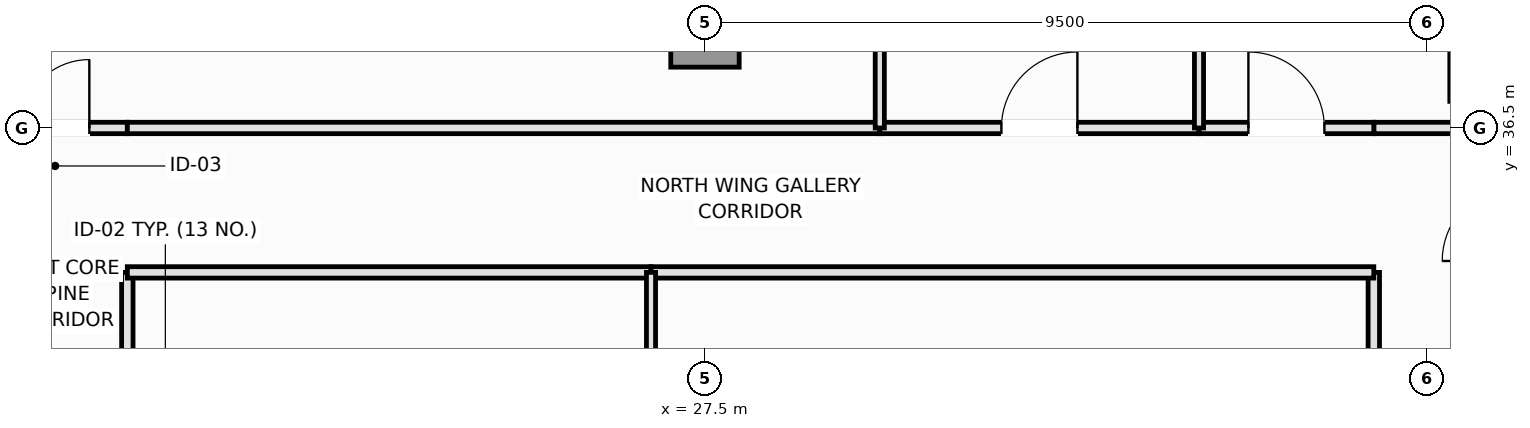
"""IFC4 building model, lengths in metres.
Left out: names, types, materials, properties, quantities, classifications, styles, units other than length and angle.
Written with IfcOpenShell. Run it as: python <this file> out.ifc"""

import sys

from ifc_helpers import new_model, si_unit, direction, frame, frame_2d, origin, origin_2d, place, context, subcontext, project, spatial, rectangle, extrude, element, fill, save


model = new_model("IFC4")
c1 = context("Model", 3, precision=1e-05, world=origin(), true_north=direction((0.0, 1.0)))
c2 = subcontext(c1, "Body", "Model", "MODEL_VIEW")
j1 = project(units=[si_unit("LENGTHUNIT", "METRE"), si_unit("PLANEANGLEUNIT", "RADIAN")], contexts=[c1])
p1 = place(None, origin())
s1 = spatial("IfcSite", under=j1, at=p1, CompositionType="ELEMENT")
p2 = place(p1, origin())
s2 = spatial("IfcBuilding", under=s1, at=p2, CompositionType="ELEMENT")
p3 = place(p2, frame((0.0, 0.0, 284.75)))
s3 = spatial("IfcBuildingStorey", under=s2, at=p3, CompositionType="ELEMENT", Elevation=284.75)
p4 = place(p3, frame((27.5, 37.75, 0.0), z_axis=(0.0, 0.0, 1.0), x_axis=(1.0, 0.0, 0.0)))
e1 = element("IfcColumn", 1, at=p4, inside=s3, PredefinedType="COLUMN", context=c2, shape_type="SweptSolid", body=[
    extrude(rectangle(XDim=0.9, YDim=0.9, at=origin_2d()), origin(), (0.0, 0.0, 1.0), 3.55),
])
p5 = place(p3, frame((19.9, 29.7, 0.0), z_axis=(0.0, 0.0, 1.0), x_axis=(0.0, 1.0, 0.0)))
e2 = element("IfcWall", 2, at=p5, inside=s3, PredefinedType="PARTITIONING", context=c2, shape_type="SweptSolid", body=[
    extrude(rectangle(XDim=4.9, YDim=0.15, at=frame_2d((2.45, 0.0))), origin(), (0.0, 0.0, 1.0), 3.39),
])
p6 = place(p5, frame((1.95, 0.0, 0.0)))
e3 = element("IfcOpeningElement", 3, at=p6, cuts=e2, PredefinedType="OPENING", context=c2, shape_type="SweptSolid", body=[
    extrude(rectangle(XDim=1.0, YDim=2.15, at=frame_2d((0.5, 1.075))), frame((0.0, 0.085, 0.0), z_axis=(0.0, -1.0, 0.0), x_axis=(1.0, 0.0, 0.0)), (0.0, 0.0, 1.0), 0.17),
])
p7 = place(p3, frame((18.0, 36.5, 0.0), z_axis=(0.0, 0.0, 1.0), x_axis=(1.0, 0.0, 0.0)))
e4 = element("IfcWall", 4, at=p7, inside=s3, PredefinedType="PARTITIONING", context=c2, shape_type="SweptSolid", body=[
    extrude(rectangle(XDim=1.9, YDim=0.15, at=frame_2d((0.95, 0.0))), origin(), (0.0, 0.0, 1.0), 3.39),
])
p8 = place(p7, frame((0.5, 0.0, 0.0)))
e5 = element("IfcOpeningElement", 5, at=p8, cuts=e4, PredefinedType="OPENING", context=c2, shape_type="SweptSolid", body=[
    extrude(rectangle(XDim=0.9, YDim=2.1, at=frame_2d((0.45, 1.05))), frame((0.0, 0.085, 0.0), z_axis=(0.0, -1.0, 0.0), x_axis=(1.0, 0.0, 0.0)), (0.0, 0.0, 1.0), 0.17),
])
p9 = place(p3, frame((36.3, 29.7, 0.0), z_axis=(0.0, 0.0, 1.0), x_axis=(0.0, 1.0, 0.0)))
e6 = element("IfcWall", 6, at=p9, inside=s3, PredefinedType="PARTITIONING", context=c2, shape_type="SweptSolid", body=[
    extrude(rectangle(XDim=4.9, YDim=0.15, at=frame_2d((2.45, 0.0))), origin(), (0.0, 0.0, 1.0), 3.39),
])
p10 = place(p9, frame((1.95, 0.0, 0.0)))
e7 = element("IfcOpeningElement", 7, at=p10, cuts=e6, PredefinedType="OPENING", context=c2, shape_type="SweptSolid", body=[
    extrude(rectangle(XDim=1.0, YDim=2.15, at=frame_2d((0.5, 1.075))), frame((0.0, 0.085, 0.0), z_axis=(0.0, -1.0, 0.0), x_axis=(1.0, 0.0, 0.0)), (0.0, 0.0, 1.0), 0.17),
])
p11 = place(p3, frame((36.3, 36.5, 0.0), z_axis=(0.0, 0.0, 1.0), x_axis=(1.0, 0.0, 0.0)))
e8 = element("IfcWall", 8, at=p11, inside=s3, PredefinedType="PARTITIONING", context=c2, shape_type="SweptSolid", body=[
    extrude(rectangle(XDim=1.9, YDim=0.15, at=frame_2d((0.95, 0.0))), origin(), (0.0, 0.0, 1.0), 3.39),
])
p12 = place(p3, frame((19.9, 34.6, 0.0), z_axis=(0.0, 0.0, 1.0), x_axis=(1.0, 0.0, 0.0)))
e9 = element("IfcWall", 9, at=p12, inside=s3, PredefinedType="PARTITIONING", context=c2, shape_type="SweptSolid", body=[
    extrude(rectangle(XDim=6.89, YDim=0.15, at=frame_2d((3.445, 0.0))), origin(), (0.0, 0.0, 1.0), 3.39),
])
p13 = place(p3, frame((26.79, 34.6, 0.0), z_axis=(0.0, 0.0, 1.0), x_axis=(1.0, 0.0, 0.0)))
e10 = element("IfcWall", 10, at=p13, inside=s3, PredefinedType="PARTITIONING", context=c2, shape_type="SweptSolid", body=[
    extrude(rectangle(XDim=9.51, YDim=0.15, at=frame_2d((4.755, 0.0))), origin(), (0.0, 0.0, 1.0), 3.39),
])
p14 = place(p3, frame((19.9, 36.5, 0.0), z_axis=(0.0, 0.0, 1.0), x_axis=(1.0, 0.0, 0.0)))
e11 = element("IfcWall", 11, at=p14, inside=s3, PredefinedType="PARTITIONING", context=c2, shape_type="SweptSolid", body=[
    extrude(rectangle(XDim=9.9, YDim=0.15, at=frame_2d((4.95, 0.0))), origin(), (0.0, 0.0, 1.0), 3.39),
])
p15 = place(p3, frame((29.8, 36.5, 0.0), z_axis=(0.0, 0.0, 1.0), x_axis=(1.0, 0.0, 0.0)))
e12 = element("IfcWall", 12, at=p15, inside=s3, PredefinedType="PARTITIONING", context=c2, shape_type="SweptSolid", body=[
    extrude(rectangle(XDim=4.2, YDim=0.15, at=frame_2d((2.1, 0.0))), origin(), (0.0, 0.0, 1.0), 3.39),
])
p16 = place(p15, frame((1.6, 0.0, 0.0)))
e13 = element("IfcOpeningElement", 13, at=p16, cuts=e12, PredefinedType="OPENING", context=c2, shape_type="SweptSolid", body=[
    extrude(rectangle(XDim=1.0, YDim=2.15, at=frame_2d((0.5, 1.075))), frame((0.0, 0.085, 0.0), z_axis=(0.0, -1.0, 0.0), x_axis=(1.0, 0.0, 0.0)), (0.0, 0.0, 1.0), 0.17),
])
p17 = place(p3, frame((34.0, 36.5, 0.0), z_axis=(0.0, 0.0, 1.0), x_axis=(1.0, 0.0, 0.0)))
e14 = element("IfcWall", 14, at=p17, inside=s3, PredefinedType="PARTITIONING", context=c2, shape_type="SweptSolid", body=[
    extrude(rectangle(XDim=2.3, YDim=0.15, at=frame_2d((1.15, 0.0))), origin(), (0.0, 0.0, 1.0), 3.39),
])
p18 = place(p17, frame((0.65, 0.0, 0.0)))
e15 = element("IfcOpeningElement", 15, at=p18, cuts=e14, PredefinedType="OPENING", context=c2, shape_type="SweptSolid", body=[
    extrude(rectangle(XDim=1.0, YDim=2.15, at=frame_2d((0.5, 1.075))), frame((0.0, 0.085, 0.0), z_axis=(0.0, -1.0, 0.0), x_axis=(1.0, 0.0, 0.0)), (0.0, 0.0, 1.0), 0.17),
])
p19 = place(p3, frame((26.79, 29.7, 0.0), z_axis=(0.0, 0.0, 1.0), x_axis=(0.0, 1.0, 0.0)))
e16 = element("IfcWall", 16, at=p19, inside=s3, PredefinedType="PARTITIONING", context=c2, shape_type="SweptSolid", body=[
    extrude(rectangle(XDim=4.9, YDim=0.12, at=frame_2d((2.45, 0.0))), origin(), (0.0, 0.0, 1.0), 3.39),
])
for number, where, z_axis, x_axis in (
    (17, (29.8, 36.5, 0.0), (0.0, 0.0, 1.0), (0.0, 1.0, 0.0)),
    (18, (34.0, 36.5, 0.0), (0.0, 0.0, 1.0), (0.0, 1.0, 0.0)),
):
    element("IfcWall", number, at=place(p3, frame(where, z_axis=z_axis, x_axis=x_axis)), inside=s3, PredefinedType="PARTITIONING", context=c2, shape_type="SweptSolid", body=[
        extrude(rectangle(XDim=7.49, YDim=0.12, at=frame_2d((3.745, 0.0))), origin(), (0.0, 0.0, 1.0), 3.39),
    ])
p20 = place(p8, origin())
e19 = element("IfcDoor", 19, at=p20, inside=s3, OperationType="SINGLE_SWING_RIGHT", PredefinedType="DOOR", context=c2, shape_type="SweptSolid", body=[
    extrude(rectangle(XDim=0.9, YDim=2.1, at=frame_2d((0.45, 1.05))), frame((0.0, 0.025, 0.0), z_axis=(0.0, -1.0, 0.0), x_axis=(1.0, 0.0, 0.0)), (0.0, 0.0, 1.0), 0.05),
])
fill(e5, e19)
p21 = place(p16, origin())
e20 = element("IfcDoor", 20, at=p21, inside=s3, OperationType="SINGLE_SWING_RIGHT", PredefinedType="DOOR", context=c2, shape_type="SweptSolid", body=[
    extrude(rectangle(XDim=1.0, YDim=2.15, at=frame_2d((0.5, 1.075))), frame((0.0, 0.025, 0.0), z_axis=(0.0, -1.0, 0.0), x_axis=(1.0, 0.0, 0.0)), (0.0, 0.0, 1.0), 0.05),
])
fill(e13, e20)
p22 = place(p18, origin())
e21 = element("IfcDoor", 21, at=p22, inside=s3, OperationType="SINGLE_SWING_LEFT", PredefinedType="DOOR", context=c2, shape_type="SweptSolid", body=[
    extrude(rectangle(XDim=1.0, YDim=2.15, at=frame_2d((0.5, 1.075))), frame((0.0, 0.025, 0.0), z_axis=(0.0, -1.0, 0.0), x_axis=(1.0, 0.0, 0.0)), (0.0, 0.0, 1.0), 0.05),
])
fill(e15, e21)
save(model, sys.argv[1])
